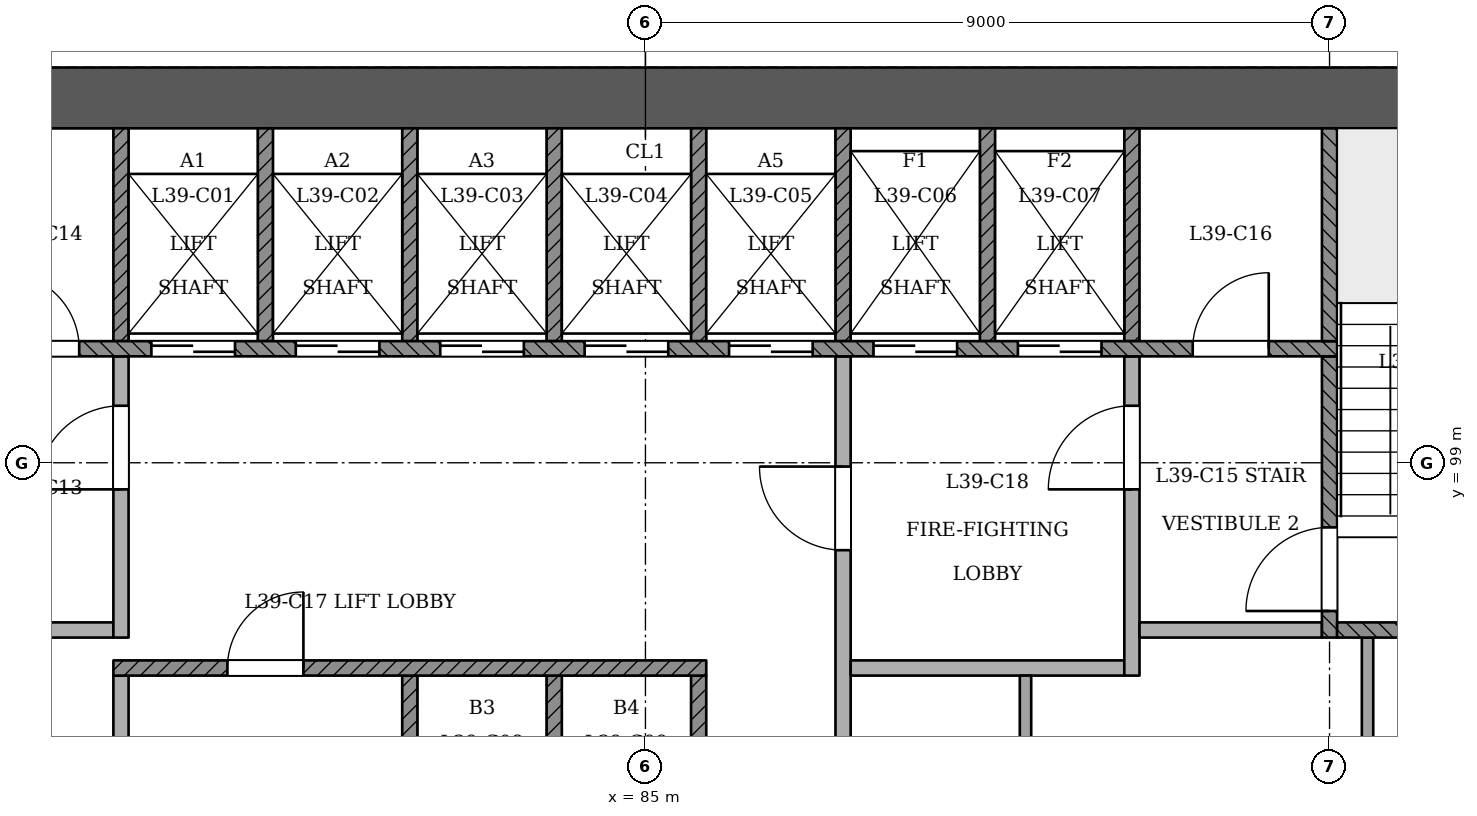
"""IFC4 building model, lengths in metres.
Left out: names, types, materials, properties, quantities, classifications, styles, units other than length and angle.
Written with IfcOpenShell. Run it as: python <this file> out.ifc"""

import sys

from ifc_helpers import new_model, si_unit, direction, frame, frame_2d, origin, place, context, subcontext, project, spatial, rectangle, extrude, element, fill, save


model = new_model("IFC4")
c1 = context("Model", 3, precision=1e-05, world=origin(), true_north=direction((0.0, 1.0)))
c2 = subcontext(c1, "Body", "Model", "MODEL_VIEW")
j1 = project(units=[si_unit("LENGTHUNIT", "METRE"), si_unit("PLANEANGLEUNIT", "RADIAN")], contexts=[c1])
p1 = place(None, origin())
s1 = spatial("IfcSite", under=j1, at=p1, CompositionType="ELEMENT")
p2 = place(p1, origin())
s2 = spatial("IfcBuilding", under=s1, at=p2, CompositionType="ELEMENT")
p3 = place(p2, frame((0.0, 0.0, 153.0)))
s3 = spatial("IfcBuildingStorey", under=s2, at=p3, CompositionType="ELEMENT", Elevation=153.0)
p4 = place(p3, frame((97.4, 103.8, 0.0), z_axis=(0.0, 0.0, 1.0), x_axis=(-1.0, 0.0, 0.0)))
e1 = element("IfcWall", 1, at=p4, inside=s3, PredefinedType="SHEAR", context=c2, shape_type="SweptSolid", body=[
    extrude(rectangle(XDim=25.2, YDim=0.8, at=frame_2d((12.6, 0.0))), origin(), (0.0, 0.0, 1.0), 3.6),
])
p5 = place(p3, frame((66.242, 97.188, 0.0), z_axis=(0.0, 0.0, 1.0), x_axis=(0.500002614046, -0.866023894559, 0.0)))
e2 = element("IfcWall", 2, at=p5, inside=s3, PredefinedType="PARTITIONING", context=c2, shape_type="SweptSolid", body=[
    extrude(rectangle(XDim=37.515, YDim=0.15, at=frame_2d((18.758, 0.0))), origin(), (0.0, 0.0, 1.0), 2.75),
])
p6 = place(p5, frame((2.8, 0.0, 0.0)))
e3 = element("IfcOpeningElement", 3, at=p6, cuts=e2, PredefinedType="OPENING", context=c2, shape_type="SweptSolid", body=[
    extrude(rectangle(XDim=1.2, YDim=2.1, at=frame_2d((0.6, 1.05))), frame((0.0, 0.085, 0.0), z_axis=(0.0, -1.0, 0.0), x_axis=(1.0, 0.0, 0.0)), (0.0, 0.0, 1.0), 0.171),
])
p7 = place(p5, frame((11.8, 0.0, 0.0)))
e4 = element("IfcOpeningElement", 4, at=p7, cuts=e2, PredefinedType="OPENING", context=c2, shape_type="SweptSolid", body=[
    extrude(rectangle(XDim=1.2, YDim=2.1, at=frame_2d((0.6, 1.05))), frame((0.0, 0.085, 0.0), z_axis=(0.0, -1.0, 0.0), x_axis=(1.0, 0.0, 0.0)), (0.0, 0.0, 1.0), 0.171),
])
p8 = place(p5, frame((24.15, 0.0, 0.0)))
e5 = element("IfcOpeningElement", 5, at=p8, cuts=e2, PredefinedType="OPENING", context=c2, shape_type="SweptSolid", body=[
    extrude(rectangle(XDim=1.2, YDim=2.1, at=frame_2d((0.6, 1.05))), frame((0.0, 0.085, 0.0), z_axis=(0.0, -1.0, 0.0), x_axis=(1.0, 0.0, 0.0)), (0.0, 0.0, 1.0), 0.171),
])
p9 = place(p5, frame((33.25, 0.0, 0.0)))
e6 = element("IfcOpeningElement", 6, at=p9, cuts=e2, PredefinedType="OPENING", context=c2, shape_type="SweptSolid", body=[
    extrude(rectangle(XDim=1.0, YDim=2.1, at=frame_2d((0.5, 1.05))), frame((0.0, 0.085, 0.0), z_axis=(0.0, -1.0, 0.0), x_axis=(1.0, 0.0, 0.0)), (0.0, 0.0, 1.0), 0.171),
])
p10 = place(p3, frame((85.065, 64.811, 0.0), z_axis=(0.0, 0.0, 1.0), x_axis=(0.500003399299, 0.866023441189, 0.0)))
e7 = element("IfcWall", 7, at=p10, inside=s3, PredefinedType="PARTITIONING", context=c2, shape_type="SweptSolid", body=[
    extrude(rectangle(XDim=37.385, YDim=0.15, at=frame_2d((18.693, 0.0))), origin(), (0.0, 0.0, 1.0), 2.75),
])
p11 = place(p10, frame((0.524, 0.0, 0.0)))
e8 = element("IfcOpeningElement", 8, at=p11, cuts=e7, PredefinedType="OPENING", context=c2, shape_type="SweptSolid", body=[
    extrude(rectangle(XDim=1.2, YDim=2.1, at=frame_2d((0.6, 1.05))), frame((0.0, 0.085, 0.0), z_axis=(0.0, -1.0, 0.0), x_axis=(1.0, 0.0, 0.0)), (0.0, 0.0, 1.0), 0.171),
])
p12 = place(p10, frame((12.036, 0.0, 0.0)))
e9 = element("IfcOpeningElement", 9, at=p12, cuts=e7, PredefinedType="OPENING", context=c2, shape_type="SweptSolid", body=[
    extrude(rectangle(XDim=1.2, YDim=2.1, at=frame_2d((0.6, 1.05))), frame((0.0, 0.085, 0.0), z_axis=(0.0, -1.0, 0.0), x_axis=(1.0, 0.0, 0.0)), (0.0, 0.0, 1.0), 0.171),
])
p13 = place(p10, frame((22.186, 0.0, 0.0)))
e10 = element("IfcOpeningElement", 10, at=p13, cuts=e7, PredefinedType="OPENING", context=c2, shape_type="SweptSolid", body=[
    extrude(rectangle(XDim=1.2, YDim=2.1, at=frame_2d((0.6, 1.05))), frame((0.0, 0.085, 0.0), z_axis=(0.0, -1.0, 0.0), x_axis=(1.0, 0.0, 0.0)), (0.0, 0.0, 1.0), 0.171),
])
p14 = place(p10, frame((31.186, 0.0, 0.0)))
e11 = element("IfcOpeningElement", 11, at=p14, cuts=e7, PredefinedType="OPENING", context=c2, shape_type="SweptSolid", body=[
    extrude(rectangle(XDim=1.2, YDim=2.1, at=frame_2d((0.6, 1.05))), frame((0.0, 0.085, 0.0), z_axis=(0.0, -1.0, 0.0), x_axis=(1.0, 0.0, 0.0)), (0.0, 0.0, 1.0), 0.171),
])
p15 = place(p3, frame((78.1, 93.4, 0.0), z_axis=(0.0, 0.0, 1.0), x_axis=(0.0, 1.0, 0.0)))
e12 = element("IfcWall", 12, at=p15, inside=s3, PredefinedType="PARTITIONING", context=c2, shape_type="SweptSolid", body=[
    extrude(rectangle(XDim=2.8, YDim=0.2, at=frame_2d((1.4, 0.0))), origin(), (0.0, 0.0, 1.0), 3.15),
])
for number, where, z_axis, x_axis in (
    (13, (81.9, 93.4, 0.0), (0.0, 0.0, 1.0), (0.0, 1.0, 0.0)),
    (14, (83.8, 93.4, 0.0), (0.0, 0.0, 1.0), (0.0, 1.0, 0.0)),
    (15, (85.7, 93.4, 0.0), (0.0, 0.0, 1.0), (0.0, 1.0, 0.0)),
):
    element("IfcWall", number, at=place(p3, frame(where, z_axis=z_axis, x_axis=x_axis)), inside=s3, PredefinedType="SOLIDWALL", context=c2, shape_type="SweptSolid", body=[
        extrude(rectangle(XDim=2.8, YDim=0.2, at=frame_2d((1.4, 0.0))), origin(), (0.0, 0.0, 1.0), 3.15),
    ])
p16 = place(p3, frame((87.6, 93.4, 0.0), z_axis=(0.0, 0.0, 1.0), x_axis=(0.0, 1.0, 0.0)))
e16 = element("IfcWall", 16, at=p16, inside=s3, PredefinedType="PARTITIONING", context=c2, shape_type="SweptSolid", body=[
    extrude(rectangle(XDim=7.0, YDim=0.2, at=frame_2d((3.5, 0.0))), origin(), (0.0, 0.0, 1.0), 3.15),
])
p17 = place(p16, frame((4.45, 0.0, 0.0)))
e17 = element("IfcOpeningElement", 17, at=p17, cuts=e16, PredefinedType="OPENING", context=c2, shape_type="SweptSolid", body=[
    extrude(rectangle(XDim=1.1, YDim=2.1, at=frame_2d((0.55, 1.05))), frame((0.0, 0.11, 0.0), z_axis=(0.0, -1.0, 0.0), x_axis=(1.0, 0.0, 0.0)), (0.0, 0.0, 1.0), 0.221),
])
p18 = place(p3, frame((90.0, 93.4, 0.0), z_axis=(0.0, 0.0, 1.0), x_axis=(0.0, 1.0, 0.0)))
e18 = element("IfcWall", 18, at=p18, inside=s3, PredefinedType="PARTITIONING", context=c2, shape_type="SweptSolid", body=[
    extrude(rectangle(XDim=2.8, YDim=0.15, at=frame_2d((1.4, 0.0))), origin(), (0.0, 0.0, 1.0), 3.15),
])
p19 = place(p3, frame((94.5, 93.4, 0.0), z_axis=(0.0, 0.0, 1.0), x_axis=(0.0, 1.0, 0.0)))
e19 = element("IfcWall", 19, at=p19, inside=s3, PredefinedType="PARTITIONING", context=c2, shape_type="SweptSolid", body=[
    extrude(rectangle(XDim=3.3, YDim=0.15, at=frame_2d((1.65, 0.0))), origin(), (0.0, 0.0, 1.0), 3.15),
])
p20 = place(p3, frame((78.0, 96.3, 0.0), z_axis=(0.0, 0.0, 1.0), x_axis=(1.0, 0.0, 0.0)))
e20 = element("IfcWall", 20, at=p20, inside=s3, PredefinedType="SOLIDWALL", context=c2, shape_type="SweptSolid", body=[
    extrude(rectangle(XDim=7.8, YDim=0.2, at=frame_2d((3.9, 0.0))), origin(), (0.0, 0.0, 1.0), 3.15),
])
p21 = place(p20, frame((1.5, 0.0, 0.0)))
e21 = element("IfcOpeningElement", 21, at=p21, cuts=e20, PredefinedType="OPENING", context=c2, shape_type="SweptSolid", body=[
    extrude(rectangle(XDim=1.0, YDim=2.1, at=frame_2d((0.5, 1.05))), frame((0.0, 0.11, 0.0), z_axis=(0.0, -1.0, 0.0), x_axis=(1.0, 0.0, 0.0)), (0.0, 0.0, 1.0), 0.221),
])
p22 = place(p3, frame((87.7, 96.3, 0.0), z_axis=(0.0, 0.0, 1.0), x_axis=(1.0, 0.0, 0.0)))
e22 = element("IfcWall", 22, at=p22, inside=s3, PredefinedType="PARTITIONING", context=c2, shape_type="SweptSolid", body=[
    extrude(rectangle(XDim=3.6, YDim=0.2, at=frame_2d((1.8, 0.0))), origin(), (0.0, 0.0, 1.0), 3.15),
])
p23 = place(p3, frame((91.4, 96.2, 0.0), z_axis=(0.0, 0.0, 1.0), x_axis=(0.0, 1.0, 0.0)))
e23 = element("IfcWall", 23, at=p23, inside=s3, PredefinedType="PARTITIONING", context=c2, shape_type="SweptSolid", body=[
    extrude(rectangle(XDim=4.2, YDim=0.2, at=frame_2d((2.1, 0.0))), origin(), (0.0, 0.0, 1.0), 3.15),
])
p24 = place(p23, frame((2.45, 0.0, 0.0)))
e24 = element("IfcOpeningElement", 24, at=p24, cuts=e23, PredefinedType="OPENING", context=c2, shape_type="SweptSolid", body=[
    extrude(rectangle(XDim=1.1, YDim=2.1, at=frame_2d((0.55, 1.05))), frame((0.0, 0.11, 0.0), z_axis=(0.0, -1.0, 0.0), x_axis=(1.0, 0.0, 0.0)), (0.0, 0.0, 1.0), 0.221),
])
p25 = place(p3, frame((76.1, 96.8, 0.0), z_axis=(0.0, 0.0, 1.0), x_axis=(1.0, 0.0, 0.0)))
e25 = element("IfcWall", 25, at=p25, inside=s3, PredefinedType="PARTITIONING", context=c2, shape_type="SweptSolid", body=[
    extrude(rectangle(XDim=1.9, YDim=0.2, at=frame_2d((0.95, 0.0))), origin(), (0.0, 0.0, 1.0), 3.15),
])
p26 = place(p3, frame((78.1, 96.7, 0.0), z_axis=(0.0, 0.0, 1.0), x_axis=(0.0, 1.0, 0.0)))
e26 = element("IfcWall", 26, at=p26, inside=s3, PredefinedType="PARTITIONING", context=c2, shape_type="SweptSolid", body=[
    extrude(rectangle(XDim=3.7, YDim=0.2, at=frame_2d((1.85, 0.0))), origin(), (0.0, 0.0, 1.0), 3.15),
])
p27 = place(p26, frame((1.95, 0.0, 0.0)))
e27 = element("IfcOpeningElement", 27, at=p27, cuts=e26, PredefinedType="OPENING", context=c2, shape_type="SweptSolid", body=[
    extrude(rectangle(XDim=1.1, YDim=2.1, at=frame_2d((0.55, 1.05))), frame((0.0, 0.11, 0.0), z_axis=(0.0, -1.0, 0.0), x_axis=(1.0, 0.0, 0.0)), (0.0, 0.0, 1.0), 0.221),
])
p28 = place(p3, frame((91.5, 96.8, 0.0), z_axis=(0.0, 0.0, 1.0), x_axis=(1.0, 0.0, 0.0)))
e28 = element("IfcWall", 28, at=p28, inside=s3, PredefinedType="PARTITIONING", context=c2, shape_type="SweptSolid", body=[
    extrude(rectangle(XDim=2.4, YDim=0.2, at=frame_2d((1.2, 0.0))), origin(), (0.0, 0.0, 1.0), 3.15),
])
p29 = place(p3, frame((94.0, 96.7, 0.0), z_axis=(0.0, 0.0, 1.0), x_axis=(0.0, 1.0, 0.0)))
e29 = element("IfcWall", 29, at=p29, inside=s3, PredefinedType="SOLIDWALL", context=c2, shape_type="SweptSolid", body=[
    extrude(rectangle(XDim=3.7, YDim=0.2, at=frame_2d((1.85, 0.0))), origin(), (0.0, 0.0, 1.0), 3.15),
])
p30 = place(p29, frame((0.35, 0.0, 0.0)))
e30 = element("IfcOpeningElement", 30, at=p30, cuts=e29, PredefinedType="OPENING", context=c2, shape_type="SweptSolid", body=[
    extrude(rectangle(XDim=1.1, YDim=2.1, at=frame_2d((0.55, 1.05))), frame((0.0, 0.11, 0.0), z_axis=(0.0, -1.0, 0.0), x_axis=(1.0, 0.0, 0.0)), (0.0, 0.0, 1.0), 0.221),
])
p31 = place(p3, frame((94.1, 96.8, 0.0), z_axis=(0.0, 0.0, 1.0), x_axis=(1.0, 0.0, 0.0)))
e31 = element("IfcWall", 31, at=p31, inside=s3, PredefinedType="SOLIDWALL", context=c2, shape_type="SweptSolid", body=[
    extrude(rectangle(XDim=2.9, YDim=0.2, at=frame_2d((1.45, 0.0))), origin(), (0.0, 0.0, 1.0), 3.15),
])
p32 = place(p3, frame((75.9, 100.5, 0.0), z_axis=(0.0, 0.0, 1.0), x_axis=(1.0, 0.0, 0.0)))
e32 = element("IfcWall", 32, at=p32, inside=s3, PredefinedType="SOLIDWALL", context=c2, shape_type="SweptSolid", body=[
    extrude(rectangle(XDim=18.2, YDim=0.2, at=frame_2d((9.1, 0.0))), origin(), (0.0, 0.0, 1.0), 3.15),
])
p33 = place(p32, frame((2.6, 0.0, 0.0)))
e33 = element("IfcOpeningElement", 33, at=p33, cuts=e32, PredefinedType="OPENING", context=c2, shape_type="SweptSolid", body=[
    extrude(rectangle(XDim=1.1, YDim=2.1, at=frame_2d((0.55, 1.05))), frame((0.0, 0.11, 0.0), z_axis=(0.0, -1.0, 0.0), x_axis=(1.0, 0.0, 0.0)), (0.0, 0.0, 1.0), 0.221),
])
p34 = place(p32, frame((4.5, 0.0, 0.0)))
e34 = element("IfcOpeningElement", 34, at=p34, cuts=e32, PredefinedType="OPENING", context=c2, shape_type="SweptSolid", body=[
    extrude(rectangle(XDim=1.1, YDim=2.1, at=frame_2d((0.55, 1.05))), frame((0.0, 0.11, 0.0), z_axis=(0.0, -1.0, 0.0), x_axis=(1.0, 0.0, 0.0)), (0.0, 0.0, 1.0), 0.221),
])
p35 = place(p32, frame((6.4, 0.0, 0.0)))
e35 = element("IfcOpeningElement", 35, at=p35, cuts=e32, PredefinedType="OPENING", context=c2, shape_type="SweptSolid", body=[
    extrude(rectangle(XDim=1.1, YDim=2.1, at=frame_2d((0.55, 1.05))), frame((0.0, 0.11, 0.0), z_axis=(0.0, -1.0, 0.0), x_axis=(1.0, 0.0, 0.0)), (0.0, 0.0, 1.0), 0.221),
])
p36 = place(p32, frame((8.3, 0.0, 0.0)))
e36 = element("IfcOpeningElement", 36, at=p36, cuts=e32, PredefinedType="OPENING", context=c2, shape_type="SweptSolid", body=[
    extrude(rectangle(XDim=1.1, YDim=2.1, at=frame_2d((0.55, 1.05))), frame((0.0, 0.11, 0.0), z_axis=(0.0, -1.0, 0.0), x_axis=(1.0, 0.0, 0.0)), (0.0, 0.0, 1.0), 0.221),
])
p37 = place(p32, frame((10.2, 0.0, 0.0)))
e37 = element("IfcOpeningElement", 37, at=p37, cuts=e32, PredefinedType="OPENING", context=c2, shape_type="SweptSolid", body=[
    extrude(rectangle(XDim=1.1, YDim=2.1, at=frame_2d((0.55, 1.05))), frame((0.0, 0.11, 0.0), z_axis=(0.0, -1.0, 0.0), x_axis=(1.0, 0.0, 0.0)), (0.0, 0.0, 1.0), 0.221),
])
p38 = place(p32, frame((12.1, 0.0, 0.0)))
e38 = element("IfcOpeningElement", 38, at=p38, cuts=e32, PredefinedType="OPENING", context=c2, shape_type="SweptSolid", body=[
    extrude(rectangle(XDim=1.1, YDim=2.1, at=frame_2d((0.55, 1.05))), frame((0.0, 0.11, 0.0), z_axis=(0.0, -1.0, 0.0), x_axis=(1.0, 0.0, 0.0)), (0.0, 0.0, 1.0), 0.221),
])
p39 = place(p32, frame((14.0, 0.0, 0.0)))
e39 = element("IfcOpeningElement", 39, at=p39, cuts=e32, PredefinedType="OPENING", context=c2, shape_type="SweptSolid", body=[
    extrude(rectangle(XDim=1.1, YDim=2.1, at=frame_2d((0.55, 1.05))), frame((0.0, 0.11, 0.0), z_axis=(0.0, -1.0, 0.0), x_axis=(1.0, 0.0, 0.0)), (0.0, 0.0, 1.0), 0.221),
])
p40 = place(p32, frame((0.65, 0.0, 0.0)))
e40 = element("IfcOpeningElement", 40, at=p40, cuts=e32, PredefinedType="OPENING", context=c2, shape_type="SweptSolid", body=[
    extrude(rectangle(XDim=1.0, YDim=2.1, at=frame_2d((0.5, 1.05))), frame((0.0, 0.11, 0.0), z_axis=(0.0, -1.0, 0.0), x_axis=(1.0, 0.0, 0.0)), (0.0, 0.0, 1.0), 0.221),
])
p41 = place(p32, frame((16.3, 0.0, 0.0)))
e41 = element("IfcOpeningElement", 41, at=p41, cuts=e32, PredefinedType="OPENING", context=c2, shape_type="SweptSolid", body=[
    extrude(rectangle(XDim=1.0, YDim=2.1, at=frame_2d((0.5, 1.05))), frame((0.0, 0.11, 0.0), z_axis=(0.0, -1.0, 0.0), x_axis=(1.0, 0.0, 0.0)), (0.0, 0.0, 1.0), 0.221),
])
for number, where, z_axis, x_axis in (
    (42, (78.1, 100.6, 0.0), (0.0, 0.0, 1.0), (0.0, 1.0, 0.0)),
    (43, (80.0, 100.6, 0.0), (0.0, 0.0, 1.0), (0.0, 1.0, 0.0)),
    (44, (81.9, 100.6, 0.0), (0.0, 0.0, 1.0), (0.0, 1.0, 0.0)),
    (45, (83.8, 100.6, 0.0), (0.0, 0.0, 1.0), (0.0, 1.0, 0.0)),
    (46, (85.7, 100.6, 0.0), (0.0, 0.0, 1.0), (0.0, 1.0, 0.0)),
    (47, (87.6, 100.6, 0.0), (0.0, 0.0, 1.0), (0.0, 1.0, 0.0)),
    (48, (89.5, 100.6, 0.0), (0.0, 0.0, 1.0), (0.0, 1.0, 0.0)),
    (49, (91.4, 100.6, 0.0), (0.0, 0.0, 1.0), (0.0, 1.0, 0.0)),
    (50, (94.0, 100.6, 0.0), (0.0, 0.0, 1.0), (0.0, 1.0, 0.0)),
):
    element("IfcWall", number, at=place(p3, frame(where, z_axis=z_axis, x_axis=x_axis)), inside=s3, PredefinedType="SOLIDWALL", context=c2, shape_type="SweptSolid", body=[
        extrude(rectangle(XDim=2.8, YDim=0.2, at=frame_2d((1.4, 0.0))), origin(), (0.0, 0.0, 1.0), 3.15),
    ])
p42 = place(p33, origin())
e51 = element("IfcDoor", 51, at=p42, inside=s3, OperationType="SLIDING_TO_RIGHT", PredefinedType="NOTDEFINED", context=c2, shape_type="SweptSolid", body=[
    extrude(rectangle(XDim=1.1, YDim=2.1, at=frame_2d((0.55, 1.05))), frame((0.0, 0.025, 0.0), z_axis=(0.0, -1.0, 0.0), x_axis=(1.0, 0.0, 0.0)), (0.0, 0.0, 1.0), 0.05),
])
fill(e33, e51)
p43 = place(p34, origin())
e52 = element("IfcDoor", 52, at=p43, inside=s3, OperationType="SLIDING_TO_LEFT", PredefinedType="NOTDEFINED", context=c2, shape_type="SweptSolid", body=[
    extrude(rectangle(XDim=1.1, YDim=2.1, at=frame_2d((0.55, 1.05))), frame((0.0, 0.025, 0.0), z_axis=(0.0, -1.0, 0.0), x_axis=(1.0, 0.0, 0.0)), (0.0, 0.0, 1.0), 0.05),
])
fill(e34, e52)
p44 = place(p35, origin())
e53 = element("IfcDoor", 53, at=p44, inside=s3, OperationType="SLIDING_TO_RIGHT", PredefinedType="NOTDEFINED", context=c2, shape_type="SweptSolid", body=[
    extrude(rectangle(XDim=1.1, YDim=2.1, at=frame_2d((0.55, 1.05))), frame((0.0, 0.025, 0.0), z_axis=(0.0, -1.0, 0.0), x_axis=(1.0, 0.0, 0.0)), (0.0, 0.0, 1.0), 0.05),
])
fill(e35, e53)
p45 = place(p36, origin())
e54 = element("IfcDoor", 54, at=p45, inside=s3, OperationType="SLIDING_TO_LEFT", PredefinedType="NOTDEFINED", context=c2, shape_type="SweptSolid", body=[
    extrude(rectangle(XDim=1.1, YDim=2.1, at=frame_2d((0.55, 1.05))), frame((0.0, 0.025, 0.0), z_axis=(0.0, -1.0, 0.0), x_axis=(1.0, 0.0, 0.0)), (0.0, 0.0, 1.0), 0.05),
])
fill(e36, e54)
p46 = place(p37, origin())
e55 = element("IfcDoor", 55, at=p46, inside=s3, OperationType="SLIDING_TO_RIGHT", PredefinedType="NOTDEFINED", context=c2, shape_type="SweptSolid", body=[
    extrude(rectangle(XDim=1.1, YDim=2.1, at=frame_2d((0.55, 1.05))), frame((0.0, 0.025, 0.0), z_axis=(0.0, -1.0, 0.0), x_axis=(1.0, 0.0, 0.0)), (0.0, 0.0, 1.0), 0.05),
])
fill(e37, e55)
p47 = place(p38, origin())
e56 = element("IfcDoor", 56, at=p47, inside=s3, OperationType="SLIDING_TO_RIGHT", PredefinedType="NOTDEFINED", context=c2, shape_type="SweptSolid", body=[
    extrude(rectangle(XDim=1.1, YDim=2.1, at=frame_2d((0.55, 1.05))), frame((0.0, 0.025, 0.0), z_axis=(0.0, -1.0, 0.0), x_axis=(1.0, 0.0, 0.0)), (0.0, 0.0, 1.0), 0.05),
])
fill(e38, e56)
p48 = place(p39, origin())
e57 = element("IfcDoor", 57, at=p48, inside=s3, OperationType="SLIDING_TO_LEFT", PredefinedType="NOTDEFINED", context=c2, shape_type="SweptSolid", body=[
    extrude(rectangle(XDim=1.1, YDim=2.1, at=frame_2d((0.55, 1.05))), frame((0.0, 0.025, 0.0), z_axis=(0.0, -1.0, 0.0), x_axis=(1.0, 0.0, 0.0)), (0.0, 0.0, 1.0), 0.05),
])
fill(e39, e57)
p49 = place(p30, origin())
e58 = element("IfcDoor", 58, at=p49, inside=s3, OperationType="SINGLE_SWING_LEFT", PredefinedType="NOTDEFINED", context=c2, shape_type="SweptSolid", body=[
    extrude(rectangle(XDim=1.1, YDim=2.1, at=frame_2d((0.55, 1.05))), frame((0.0, 0.025, 0.0), z_axis=(0.0, -1.0, 0.0), x_axis=(1.0, 0.0, 0.0)), (0.0, 0.0, 1.0), 0.05),
])
fill(e30, e58)
p50 = place(p27, origin())
e59 = element("IfcDoor", 59, at=p50, inside=s3, OperationType="SINGLE_SWING_LEFT", PredefinedType="NOTDEFINED", context=c2, shape_type="SweptSolid", body=[
    extrude(rectangle(XDim=1.1, YDim=2.1, at=frame_2d((0.55, 1.05))), frame((0.0, 0.025, 0.0), z_axis=(0.0, -1.0, 0.0), x_axis=(1.0, 0.0, 0.0)), (0.0, 0.0, 1.0), 0.05),
])
fill(e27, e59)
p51 = place(p17, origin())
e60 = element("IfcDoor", 60, at=p51, inside=s3, OperationType="SINGLE_SWING_RIGHT", PredefinedType="NOTDEFINED", context=c2, shape_type="SweptSolid", body=[
    extrude(rectangle(XDim=1.1, YDim=2.1, at=frame_2d((0.55, 1.05))), frame((0.0, 0.025, 0.0), z_axis=(0.0, -1.0, 0.0), x_axis=(1.0, 0.0, 0.0)), (0.0, 0.0, 1.0), 0.05),
])
fill(e17, e60)
p52 = place(p24, origin())
e61 = element("IfcDoor", 61, at=p52, inside=s3, OperationType="SINGLE_SWING_LEFT", PredefinedType="NOTDEFINED", context=c2, shape_type="SweptSolid", body=[
    extrude(rectangle(XDim=1.1, YDim=2.1, at=frame_2d((0.55, 1.05))), frame((0.0, 0.025, 0.0), z_axis=(0.0, -1.0, 0.0), x_axis=(1.0, 0.0, 0.0)), (0.0, 0.0, 1.0), 0.05),
])
fill(e24, e61)
p53 = place(p40, origin())
e62 = element("IfcDoor", 62, at=p53, inside=s3, OperationType="SINGLE_SWING_LEFT", PredefinedType="NOTDEFINED", context=c2, shape_type="SweptSolid", body=[
    extrude(rectangle(XDim=1.0, YDim=2.1, at=frame_2d((0.5, 1.05))), frame((0.0, 0.025, 0.0), z_axis=(0.0, -1.0, 0.0), x_axis=(1.0, 0.0, 0.0)), (0.0, 0.0, 1.0), 0.05),
])
fill(e40, e62)
p54 = place(p41, origin())
e63 = element("IfcDoor", 63, at=p54, inside=s3, OperationType="SINGLE_SWING_RIGHT", PredefinedType="NOTDEFINED", context=c2, shape_type="SweptSolid", body=[
    extrude(rectangle(XDim=1.0, YDim=2.1, at=frame_2d((0.5, 1.05))), frame((0.0, 0.025, 0.0), z_axis=(0.0, -1.0, 0.0), x_axis=(1.0, 0.0, 0.0)), (0.0, 0.0, 1.0), 0.05),
])
fill(e41, e63)
p55 = place(p21, origin())
e64 = element("IfcDoor", 64, at=p55, inside=s3, OperationType="SINGLE_SWING_RIGHT", PredefinedType="NOTDEFINED", context=c2, shape_type="SweptSolid", body=[
    extrude(rectangle(XDim=1.0, YDim=2.1, at=frame_2d((0.5, 1.05))), frame((0.0, 0.025, 0.0), z_axis=(0.0, -1.0, 0.0), x_axis=(1.0, 0.0, 0.0)), (0.0, 0.0, 1.0), 0.05),
])
fill(e21, e64)
save(model, sys.argv[1])
